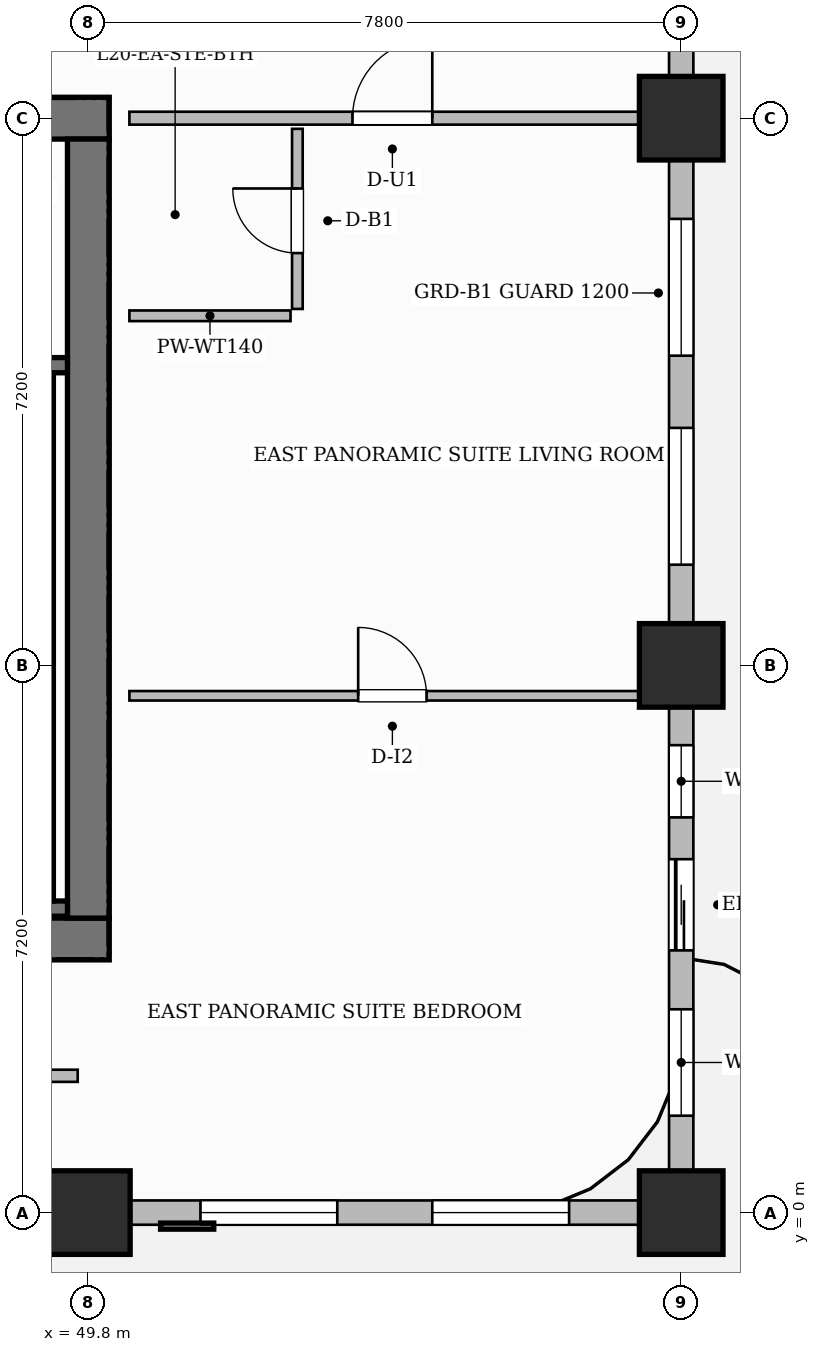
"""IFC4 building model, lengths in metres.
Left out: names, types, materials, properties, quantities, classifications, styles, units other than length and angle.
Written with IfcOpenShell. Run it as: python <this file> out.ifc"""

import sys

from ifc_helpers import new_model, si_unit, direction, frame, frame_2d, origin, origin_2d, place, context, subcontext, project, spatial, rectangle, extrude, source, transform, mapped, element, fill, save


model = new_model("IFC4")
c1 = context("Model", 3, precision=1e-05, world=origin(), true_north=direction((0.0, 1.0)))
c2 = subcontext(c1, "Body", "Model", "MODEL_VIEW")
j1 = project(units=[si_unit("LENGTHUNIT", "METRE"), si_unit("PLANEANGLEUNIT", "RADIAN")], contexts=[c1])
p1 = place(None, origin())
s1 = spatial("IfcSite", under=j1, at=p1, CompositionType="ELEMENT")
p2 = place(p1, origin())
s2 = spatial("IfcBuilding", under=s1, at=p2, CompositionType="ELEMENT")
p3 = place(p2, frame((0.0, 0.0, 84.2)))
s3 = spatial("IfcBuildingStorey", under=s2, at=p3, CompositionType="ELEMENT", Elevation=84.2)
p4 = place(p3, frame((34.525, 3.6, 0.0), z_axis=(0.0, 0.0, 1.0), x_axis=(1.0, 0.0, 0.0)))
e1 = element("IfcWall", 1, at=p4, inside=s3, PredefinedType="SHEAR", context=c2, shape_type="SweptSolid", body=[
    extrude(rectangle(XDim=15.55, YDim=0.55, at=frame_2d((7.775, 0.0))), origin(), (0.0, 0.0, 1.0), 3.7),
])
p5 = place(p4, frame((4.745, 0.0, 0.0)))
e2 = element("IfcOpeningElement", 2, at=p5, cuts=e1, PredefinedType="OPENING", context=c2, shape_type="SweptSolid", body=[
    extrude(rectangle(XDim=0.9, YDim=2.1, at=frame_2d((0.45, 1.05))), frame((0.0, 0.285, 0.0), z_axis=(0.0, -1.0, 0.0), x_axis=(1.0, 0.0, 0.0)), (0.0, 0.0, 1.0), 0.57),
])
p6 = place(p4, frame((7.125, 0.0, 0.0)))
e3 = element("IfcOpeningElement", 3, at=p6, cuts=e1, PredefinedType="OPENING", context=c2, shape_type="SweptSolid", body=[
    extrude(rectangle(XDim=0.9, YDim=2.1, at=frame_2d((0.45, 1.05))), frame((0.0, 0.285, 0.0), z_axis=(0.0, -1.0, 0.0), x_axis=(1.0, 0.0, 0.0)), (0.0, 0.0, 1.0), 0.57),
])
p7 = place(p3, frame((34.525, 14.4, 0.0), z_axis=(0.0, 0.0, 1.0), x_axis=(1.0, 0.0, 0.0)))
e4 = element("IfcWall", 4, at=p7, inside=s3, PredefinedType="SHEAR", context=c2, shape_type="SweptSolid", body=[
    extrude(rectangle(XDim=15.55, YDim=0.55, at=frame_2d((7.775, 0.0))), origin(), (0.0, 0.0, 1.0), 3.7),
])
p8 = place(p7, frame((5.405, 0.0, 0.0)))
e5 = element("IfcOpeningElement", 5, at=p8, cuts=e4, PredefinedType="OPENING", context=c2, shape_type="SweptSolid", body=[
    extrude(rectangle(XDim=1.5, YDim=2.2, at=frame_2d((0.75, 1.1))), frame((0.0, 0.285, 0.0), z_axis=(0.0, -1.0, 0.0), x_axis=(1.0, 0.0, 0.0)), (0.0, 0.0, 1.0), 0.57),
])
p9 = place(p7, frame((1.62, 0.0, 0.0)))
e6 = element("IfcOpeningElement", 6, at=p9, cuts=e4, PredefinedType="OPENING", context=c2, shape_type="SweptSolid", body=[
    extrude(rectangle(XDim=1.05, YDim=2.15, at=frame_2d((0.525, 1.075))), frame((0.0, 0.285, 0.0), z_axis=(0.0, -1.0, 0.0), x_axis=(1.0, 0.0, 0.0)), (0.0, 0.0, 1.0), 0.57),
])
p10 = place(p7, frame((11.25, 0.0, 0.0)))
e7 = element("IfcOpeningElement", 7, at=p10, cuts=e4, PredefinedType="OPENING", context=c2, shape_type="SweptSolid", body=[
    extrude(rectangle(XDim=1.05, YDim=2.15, at=frame_2d((0.525, 1.075))), frame((0.0, 0.285, 0.0), z_axis=(0.0, -1.0, 0.0), x_axis=(1.0, 0.0, 0.0)), (0.0, 0.0, 1.0), 0.57),
])
p11 = place(p3, frame((49.8, 3.875, 0.0), z_axis=(0.0, 0.0, 1.0), x_axis=(0.0, 1.0, 0.0)))
e8 = element("IfcWall", 8, at=p11, inside=s3, PredefinedType="SHEAR", context=c2, shape_type="SweptSolid", body=[
    extrude(rectangle(XDim=10.25, YDim=0.55, at=frame_2d((5.125, 0.0))), origin(), (0.0, 0.0, 1.0), 3.7),
])
m1 = source(origin(), c2, "Body", "SweptSolid", [
    extrude(rectangle(XDim=1.1, YDim=1.1, at=origin_2d()), origin(), (0.0, 0.0, 1.0), 3.7),
])
for number, where, z_axis, x_axis in (
    (9, (49.8, 0.0, 0.0), (0.0, 0.0, 1.0), (1.0, 0.0, 0.0)),
    (10, (57.6, 0.0, 0.0), (0.0, 0.0, 1.0), (1.0, 0.0, 0.0)),
    (11, (57.6, 7.2, 0.0), (0.0, 0.0, 1.0), (1.0, 0.0, 0.0)),
    (12, (57.6, 14.4, 0.0), (0.0, 0.0, 1.0), (1.0, 0.0, 0.0)),
):
    element("IfcColumn", number, at=place(p3, frame(where, z_axis=z_axis, x_axis=x_axis)), inside=s3, PredefinedType="COLUMN", context=c2, shape_type="MappedRepresentation", body=[
        mapped(m1, transform((0.0, 0.0, 0.0), scale=1.0)),
    ])
p12 = place(p3, frame((43.12, 4.0, 0.0), z_axis=(0.0, 0.0, 1.0), x_axis=(1.0, 0.0, 0.0)))
e13 = element("IfcWall", 13, at=p12, inside=s3, PredefinedType="SHEAR", context=c2, shape_type="SweptSolid", body=[
    extrude(rectangle(XDim=6.405, YDim=0.2, at=frame_2d((3.202, 0.0))), origin(), (0.0, 0.0, 1.0), 3.7),
])
p13 = place(p3, frame((49.24, 4.1, 0.0), z_axis=(0.0, 0.0, 1.0), x_axis=(0.0, 1.0, 0.0)))
e14 = element("IfcWall", 14, at=p13, inside=s3, PredefinedType="SHEAR", context=c2, shape_type="SweptSolid", body=[
    extrude(rectangle(XDim=6.95, YDim=0.2, at=frame_2d((3.475, 0.0))), origin(), (0.0, 0.0, 1.0), 3.7),
])
p14 = place(p3, frame((43.12, 11.15, 0.0), z_axis=(0.0, 0.0, 1.0), x_axis=(1.0, 0.0, 0.0)))
e15 = element("IfcWall", 15, at=p14, inside=s3, PredefinedType="SHEAR", context=c2, shape_type="SweptSolid", body=[
    extrude(rectangle(XDim=6.405, YDim=0.2, at=frame_2d((3.202, 0.0))), origin(), (0.0, 0.0, 1.0), 3.7),
])
p15 = place(p14, frame((1.045, 0.0, 0.0)))
e16 = element("IfcOpeningElement", 16, at=p15, cuts=e15, PredefinedType="OPENING", context=c2, shape_type="SweptSolid", body=[
    extrude(rectangle(XDim=1.05, YDim=2.2, at=frame_2d((0.525, 1.1))), frame((0.0, 0.11, 0.0), z_axis=(0.0, -1.0, 0.0), x_axis=(1.0, 0.0, 0.0)), (0.0, 0.0, 1.0), 0.22),
])
p16 = place(p14, frame((4.125, 0.0, 0.0)))
e17 = element("IfcOpeningElement", 17, at=p16, cuts=e15, PredefinedType="OPENING", context=c2, shape_type="SweptSolid", body=[
    extrude(rectangle(XDim=1.05, YDim=2.2, at=frame_2d((0.525, 1.1))), frame((0.0, 0.11, 0.0), z_axis=(0.0, -1.0, 0.0), x_axis=(1.0, 0.0, 0.0)), (0.0, 0.0, 1.0), 0.22),
])
p17 = place(p3, frame((30.29, 1.8, 0.0), z_axis=(0.0, 0.0, 1.0), x_axis=(1.0, 0.0, 0.0)))
e18 = element("IfcWall", 18, at=p17, inside=s3, PredefinedType="PARTITIONING", context=c2, shape_type="SweptSolid", body=[
    extrude(rectangle(XDim=19.37, YDim=0.16, at=frame_2d((9.685, 0.0))), origin(), (0.0, 0.0, 1.0), 3.45),
])
p18 = place(p17, frame((9.735, 0.0, 0.0)))
e19 = element("IfcOpeningElement", 19, at=p18, cuts=e18, PredefinedType="OPENING", context=c2, shape_type="SweptSolid", body=[
    extrude(rectangle(XDim=0.95, YDim=2.15, at=frame_2d((0.475, 1.075))), frame((0.0, 0.09, 0.0), z_axis=(0.0, -1.0, 0.0), x_axis=(1.0, 0.0, 0.0)), (0.0, 0.0, 1.0), 0.18),
])
p19 = place(p3, frame((50.34, 14.4, 0.0), z_axis=(0.0, 0.0, 1.0), x_axis=(1.0, 0.0, 0.0)))
e20 = element("IfcWall", 20, at=p19, inside=s3, PredefinedType="PARTITIONING", context=c2, shape_type="SweptSolid", body=[
    extrude(rectangle(XDim=7.07, YDim=0.17, at=frame_2d((3.535, 0.0))), origin(), (0.0, 0.0, 1.0), 2.885),
])
p20 = place(p19, frame((2.935, 0.0, 0.0)))
e21 = element("IfcOpeningElement", 21, at=p20, cuts=e20, PredefinedType="OPENING", context=c2, shape_type="SweptSolid", body=[
    extrude(rectangle(XDim=1.05, YDim=2.25, at=frame_2d((0.525, 1.125))), frame((0.0, 0.095, 0.0), z_axis=(0.0, -1.0, 0.0), x_axis=(1.0, 0.0, 0.0)), (0.0, 0.0, 1.0), 0.19),
])
p21 = place(p3, frame((52.55, 11.89, 0.0), z_axis=(0.0, 0.0, 1.0), x_axis=(0.0, 1.0, 0.0)))
e22 = element("IfcWall", 22, at=p21, inside=s3, PredefinedType="PARTITIONING", context=c2, shape_type="SweptSolid", body=[
    extrude(rectangle(XDim=2.37, YDim=0.14, at=frame_2d((1.185, 0.0))), origin(), (0.0, 0.0, 1.0), 3.45),
])
p22 = place(p21, frame((0.735, 0.0, 0.0)))
e23 = element("IfcOpeningElement", 23, at=p22, cuts=e22, PredefinedType="OPENING", context=c2, shape_type="SweptSolid", body=[
    extrude(rectangle(XDim=0.85, YDim=2.1, at=frame_2d((0.425, 1.05))), frame((0.0, 0.08, 0.0), z_axis=(0.0, -1.0, 0.0), x_axis=(1.0, 0.0, 0.0)), (0.0, 0.0, 1.0), 0.16),
])
p23 = place(p3, frame((50.34, 11.8, 0.0), z_axis=(0.0, 0.0, 1.0), x_axis=(1.0, 0.0, 0.0)))
e24 = element("IfcWall", 24, at=p23, inside=s3, PredefinedType="PARTITIONING", context=c2, shape_type="SweptSolid", body=[
    extrude(rectangle(XDim=2.12, YDim=0.14, at=frame_2d((1.06, 0.0))), origin(), (0.0, 0.0, 1.0), 3.45),
])
p24 = place(p3, frame((50.34, 6.8, 0.0), z_axis=(0.0, 0.0, 1.0), x_axis=(1.0, 0.0, 0.0)))
e25 = element("IfcWall", 25, at=p24, inside=s3, PredefinedType="PARTITIONING", context=c2, shape_type="SweptSolid", body=[
    extrude(rectangle(XDim=7.07, YDim=0.125, at=frame_2d((3.535, 0.0))), origin(), (0.0, 0.0, 1.0), 3.45),
])
p25 = place(p24, frame((3.01, 0.0, 0.0)))
e26 = element("IfcOpeningElement", 26, at=p25, cuts=e25, PredefinedType="OPENING", context=c2, shape_type="SweptSolid", body=[
    extrude(rectangle(XDim=0.9, YDim=2.15, at=frame_2d((0.45, 1.075))), frame((0.0, 0.073, 0.0), z_axis=(0.0, -1.0, 0.0), x_axis=(1.0, 0.0, 0.0)), (0.0, 0.0, 1.0), 0.145),
])
p26 = place(p3, frame((14.4, 0.0, 0.0), z_axis=(0.0, 0.0, 1.0), x_axis=(1.0, 0.0, 0.0)))
e27 = element("IfcWall", 27, at=p26, inside=s3, PredefinedType="SOLIDWALL", context=c2, shape_type="SweptSolid", body=[
    extrude(rectangle(XDim=43.2, YDim=0.32, at=frame_2d((21.6, 0.0))), origin(), (0.0, 0.0, 1.0), 2.885),
])
p27 = place(p26, frame((0.85, 0.0, 0.0)))
e28 = element("IfcOpeningElement", 28, at=p27, cuts=e27, PredefinedType="OPENING", context=c2, shape_type="SweptSolid", body=[
    extrude(rectangle(XDim=1.2, YDim=2.2, at=frame_2d((0.6, 1.1))), frame((0.0, 0.17, 0.0), z_axis=(0.0, -1.0, 0.0), x_axis=(1.0, 0.0, 0.0)), (0.0, 0.0, 1.0), 0.34),
])
p28 = place(p26, frame((3.475, 0.0, 0.8)))
e29 = element("IfcOpeningElement", 29, at=p28, cuts=e27, PredefinedType="OPENING", context=c2, shape_type="SweptSolid", body=[
    extrude(rectangle(XDim=1.8, YDim=1.85, at=frame_2d((0.9, 0.925))), frame((0.0, 0.17, 0.0), z_axis=(0.0, -1.0, 0.0), x_axis=(1.0, 0.0, 0.0)), (0.0, 0.0, 1.0), 0.34),
])
p29 = place(p26, frame((8.181, 0.0, 0.8)))
e30 = element("IfcOpeningElement", 30, at=p29, cuts=e27, PredefinedType="OPENING", context=c2, shape_type="SweptSolid", body=[
    extrude(rectangle(XDim=0.95, YDim=1.75, at=frame_2d((0.475, 0.875))), frame((0.0, 0.17, 0.0), z_axis=(0.0, -1.0, 0.0), x_axis=(1.0, 0.0, 0.0)), (0.0, 0.0, 1.0), 0.34),
])
p30 = place(p26, frame((10.564, 0.0, 0.8)))
e31 = element("IfcOpeningElement", 31, at=p30, cuts=e27, PredefinedType="OPENING", context=c2, shape_type="SweptSolid", body=[
    extrude(rectangle(XDim=1.8, YDim=1.85, at=frame_2d((0.9, 0.925))), frame((0.0, 0.17, 0.0), z_axis=(0.0, -1.0, 0.0), x_axis=(1.0, 0.0, 0.0)), (0.0, 0.0, 1.0), 0.34),
])
p31 = place(p26, frame((16.804, 0.0, 0.8)))
e32 = element("IfcOpeningElement", 32, at=p31, cuts=e27, PredefinedType="OPENING", context=c2, shape_type="SweptSolid", body=[
    extrude(rectangle(XDim=1.8, YDim=1.85, at=frame_2d((0.9, 0.925))), frame((0.0, 0.17, 0.0), z_axis=(0.0, -1.0, 0.0), x_axis=(1.0, 0.0, 0.0)), (0.0, 0.0, 1.0), 0.34),
])
p32 = place(p26, frame((21.725, 0.0, 0.8)))
e33 = element("IfcOpeningElement", 33, at=p32, cuts=e27, PredefinedType="OPENING", context=c2, shape_type="SweptSolid", body=[
    extrude(rectangle(XDim=1.8, YDim=1.85, at=frame_2d((0.9, 0.925))), frame((0.0, 0.17, 0.0), z_axis=(0.0, -1.0, 0.0), x_axis=(1.0, 0.0, 0.0)), (0.0, 0.0, 1.0), 0.34),
])
p33 = place(p26, frame((24.475, 0.0, 0.8)))
e34 = element("IfcOpeningElement", 34, at=p33, cuts=e27, PredefinedType="OPENING", context=c2, shape_type="SweptSolid", body=[
    extrude(rectangle(XDim=1.8, YDim=1.85, at=frame_2d((0.9, 0.925))), frame((0.0, 0.17, 0.0), z_axis=(0.0, -1.0, 0.0), x_axis=(1.0, 0.0, 0.0)), (0.0, 0.0, 1.0), 0.34),
])
p34 = place(p26, frame((29.075, 0.0, 0.8)))
e35 = element("IfcOpeningElement", 35, at=p34, cuts=e27, PredefinedType="OPENING", context=c2, shape_type="SweptSolid", body=[
    extrude(rectangle(XDim=1.8, YDim=1.85, at=frame_2d((0.9, 0.925))), frame((0.0, 0.17, 0.0), z_axis=(0.0, -1.0, 0.0), x_axis=(1.0, 0.0, 0.0)), (0.0, 0.0, 1.0), 0.34),
])
p35 = place(p26, frame((32.125, 0.0, 0.8)))
e36 = element("IfcOpeningElement", 36, at=p35, cuts=e27, PredefinedType="OPENING", context=c2, shape_type="SweptSolid", body=[
    extrude(rectangle(XDim=1.8, YDim=1.85, at=frame_2d((0.9, 0.925))), frame((0.0, 0.17, 0.0), z_axis=(0.0, -1.0, 0.0), x_axis=(1.0, 0.0, 0.0)), (0.0, 0.0, 1.0), 0.34),
])
p36 = place(p26, frame((36.875, 0.0, 0.8)))
e37 = element("IfcOpeningElement", 37, at=p36, cuts=e27, PredefinedType="OPENING", context=c2, shape_type="SweptSolid", body=[
    extrude(rectangle(XDim=1.8, YDim=1.85, at=frame_2d((0.9, 0.925))), frame((0.0, 0.17, 0.0), z_axis=(0.0, -1.0, 0.0), x_axis=(1.0, 0.0, 0.0)), (0.0, 0.0, 1.0), 0.34),
])
p37 = place(p26, frame((39.925, 0.0, 0.8)))
e38 = element("IfcOpeningElement", 38, at=p37, cuts=e27, PredefinedType="OPENING", context=c2, shape_type="SweptSolid", body=[
    extrude(rectangle(XDim=1.8, YDim=1.85, at=frame_2d((0.9, 0.925))), frame((0.0, 0.17, 0.0), z_axis=(0.0, -1.0, 0.0), x_axis=(1.0, 0.0, 0.0)), (0.0, 0.0, 1.0), 0.34),
])
p38 = place(p3, frame((57.6, 0.05, 0.0), z_axis=(0.0, 0.0, 1.0), x_axis=(0.0, 1.0, 0.0)))
e39 = element("IfcWall", 39, at=p38, inside=s3, PredefinedType="SOLIDWALL", context=c2, shape_type="SweptSolid", body=[
    extrude(rectangle(XDim=21.5, YDim=0.32, at=frame_2d((10.75, 0.0))), origin(), (0.0, 0.0, 1.0), 2.885),
])
p39 = place(p38, frame((3.4, 0.0, 0.0)))
e40 = element("IfcOpeningElement", 40, at=p39, cuts=e39, PredefinedType="OPENING", context=c2, shape_type="SweptSolid", body=[
    extrude(rectangle(XDim=1.2, YDim=2.2, at=frame_2d((0.6, 1.1))), frame((0.0, 0.17, 0.0), z_axis=(0.0, -1.0, 0.0), x_axis=(1.0, 0.0, 0.0)), (0.0, 0.0, 1.0), 0.34),
])
p40 = place(p38, frame((1.225, 0.0, 0.8)))
e41 = element("IfcOpeningElement", 41, at=p40, cuts=e39, PredefinedType="OPENING", context=c2, shape_type="SweptSolid", body=[
    extrude(rectangle(XDim=1.4, YDim=1.85, at=frame_2d((0.7, 0.925))), frame((0.0, 0.17, 0.0), z_axis=(0.0, -1.0, 0.0), x_axis=(1.0, 0.0, 0.0)), (0.0, 0.0, 1.0), 0.34),
])
p41 = place(p38, frame((5.15, 0.0, 0.8)))
e42 = element("IfcOpeningElement", 42, at=p41, cuts=e39, PredefinedType="OPENING", context=c2, shape_type="SweptSolid", body=[
    extrude(rectangle(XDim=0.95, YDim=1.75, at=frame_2d((0.475, 0.875))), frame((0.0, 0.17, 0.0), z_axis=(0.0, -1.0, 0.0), x_axis=(1.0, 0.0, 0.0)), (0.0, 0.0, 1.0), 0.34),
])
p42 = place(p38, frame((8.475, 0.0, 0.8)))
e43 = element("IfcOpeningElement", 43, at=p42, cuts=e39, PredefinedType="OPENING", context=c2, shape_type="SweptSolid", body=[
    extrude(rectangle(XDim=1.8, YDim=1.85, at=frame_2d((0.9, 0.925))), frame((0.0, 0.17, 0.0), z_axis=(0.0, -1.0, 0.0), x_axis=(1.0, 0.0, 0.0)), (0.0, 0.0, 1.0), 0.34),
])
p43 = place(p38, frame((11.225, 0.0, 0.8)))
e44 = element("IfcOpeningElement", 44, at=p43, cuts=e39, PredefinedType="OPENING", context=c2, shape_type="SweptSolid", body=[
    extrude(rectangle(XDim=1.8, YDim=1.85, at=frame_2d((0.9, 0.925))), frame((0.0, 0.17, 0.0), z_axis=(0.0, -1.0, 0.0), x_axis=(1.0, 0.0, 0.0)), (0.0, 0.0, 1.0), 0.34),
])
p44 = place(p38, frame((17.679, 0.0, 0.8)))
e45 = element("IfcOpeningElement", 45, at=p44, cuts=e39, PredefinedType="OPENING", context=c2, shape_type="SweptSolid", body=[
    extrude(rectangle(XDim=1.8, YDim=1.85, at=frame_2d((0.9, 0.925))), frame((0.0, 0.17, 0.0), z_axis=(0.0, -1.0, 0.0), x_axis=(1.0, 0.0, 0.0)), (0.0, 0.0, 1.0), 0.34),
])
m2 = source(origin(), c2, "Body", "SweptSolid", [
    extrude(rectangle(XDim=1.05, YDim=2.25, at=frame_2d((0.525, 1.125))), frame((0.0, 0.025, 0.0), z_axis=(0.0, -1.0, 0.0), x_axis=(1.0, 0.0, 0.0)), (0.0, 0.0, 1.0), 0.05),
])
p45 = place(p20, origin())
e46 = element("IfcDoor", 46, at=p45, inside=s3, OperationType="SINGLE_SWING_RIGHT", PredefinedType="DOOR", context=c2, shape_type="MappedRepresentation", body=[
    mapped(m2, transform((0.0, 0.0, 0.0), scale=1.0)),
])
fill(e21, e46)
m3 = source(origin(), c2, "Body", "SweptSolid", [
    extrude(rectangle(XDim=0.85, YDim=2.1, at=frame_2d((0.425, 1.05))), frame((0.0, 0.025, 0.0), z_axis=(0.0, -1.0, 0.0), x_axis=(1.0, 0.0, 0.0)), (0.0, 0.0, 1.0), 0.05),
])
p46 = place(p22, origin())
e47 = element("IfcDoor", 47, at=p46, inside=s3, OperationType="SINGLE_SWING_RIGHT", PredefinedType="DOOR", context=c2, shape_type="MappedRepresentation", body=[
    mapped(m3, transform((0.0, 0.0, 0.0), scale=1.0)),
])
fill(e23, e47)
m4 = source(origin(), c2, "Body", "SweptSolid", [
    extrude(rectangle(XDim=0.9, YDim=2.15, at=frame_2d((0.45, 1.075))), frame((0.0, 0.025, 0.0), z_axis=(0.0, -1.0, 0.0), x_axis=(1.0, 0.0, 0.0)), (0.0, 0.0, 1.0), 0.05),
])
p47 = place(p25, origin())
e48 = element("IfcDoor", 48, at=p47, inside=s3, OperationType="SINGLE_SWING_LEFT", PredefinedType="DOOR", context=c2, shape_type="MappedRepresentation", body=[
    mapped(m4, transform((0.0, 0.0, 0.0), scale=1.0)),
])
fill(e26, e48)
m5 = source(origin(), c2, "Body", "SweptSolid", [
    extrude(rectangle(XDim=1.2, YDim=2.2, at=frame_2d((0.6, 1.1))), frame((0.0, 0.025, 0.0), z_axis=(0.0, -1.0, 0.0), x_axis=(1.0, 0.0, 0.0)), (0.0, 0.0, 1.0), 0.05),
])
p48 = place(p39, origin())
e49 = element("IfcDoor", 49, at=p48, inside=s3, OperationType="SLIDING_TO_LEFT", PredefinedType="DOOR", context=c2, shape_type="MappedRepresentation", body=[
    mapped(m5, transform((0.0, 0.0, 0.0), scale=1.0)),
])
fill(e40, e49)
m6 = source(origin(), c2, "Body", "SweptSolid", [
    extrude(rectangle(XDim=1.8, YDim=1.85, at=frame_2d((0.9, 0.925))), frame((0.0, 0.03, 0.0), z_axis=(0.0, -1.0, 0.0), x_axis=(1.0, 0.0, 0.0)), (0.0, 0.0, 1.0), 0.06),
])
p49 = place(p36, origin())
e50 = element("IfcWindow", 50, at=p49, inside=s3, PartitioningType="DOUBLE_PANEL_VERTICAL", PredefinedType="WINDOW", context=c2, shape_type="MappedRepresentation", body=[
    mapped(m6, transform((0.0, 0.0, 0.0), scale=1.0)),
])
fill(e37, e50)
p50 = place(p37, origin())
e51 = element("IfcWindow", 51, at=p50, inside=s3, PartitioningType="DOUBLE_PANEL_VERTICAL", PredefinedType="WINDOW", context=c2, shape_type="MappedRepresentation", body=[
    mapped(m6, transform((0.0, 0.0, 0.0), scale=1.0)),
])
fill(e38, e51)
m7 = source(origin(), c2, "Body", "SweptSolid", [
    extrude(rectangle(XDim=1.4, YDim=1.85, at=frame_2d((0.7, 0.925))), frame((0.0, 0.03, 0.0), z_axis=(0.0, -1.0, 0.0), x_axis=(1.0, 0.0, 0.0)), (0.0, 0.0, 1.0), 0.06),
])
p51 = place(p40, origin())
e52 = element("IfcWindow", 52, at=p51, inside=s3, PartitioningType="SINGLE_PANEL", PredefinedType="WINDOW", context=c2, shape_type="MappedRepresentation", body=[
    mapped(m7, transform((0.0, 0.0, 0.0), scale=1.0)),
])
fill(e41, e52)
m8 = source(origin(), c2, "Body", "SweptSolid", [
    extrude(rectangle(XDim=0.95, YDim=1.75, at=frame_2d((0.475, 0.875))), frame((0.0, 0.03, 0.0), z_axis=(0.0, -1.0, 0.0), x_axis=(1.0, 0.0, 0.0)), (0.0, 0.0, 1.0), 0.06),
])
p52 = place(p41, origin())
e53 = element("IfcWindow", 53, at=p52, inside=s3, PartitioningType="SINGLE_PANEL", PredefinedType="WINDOW", context=c2, shape_type="MappedRepresentation", body=[
    mapped(m8, transform((0.0, 0.0, 0.0), scale=1.0)),
])
fill(e42, e53)
p53 = place(p42, origin())
e54 = element("IfcWindow", 54, at=p53, inside=s3, PartitioningType="DOUBLE_PANEL_VERTICAL", PredefinedType="WINDOW", context=c2, shape_type="MappedRepresentation", body=[
    mapped(m6, transform((0.0, 0.0, 0.0), scale=1.0)),
])
fill(e43, e54)
p54 = place(p43, origin())
e55 = element("IfcWindow", 55, at=p54, inside=s3, PartitioningType="DOUBLE_PANEL_VERTICAL", PredefinedType="WINDOW", context=c2, shape_type="MappedRepresentation", body=[
    mapped(m6, transform((0.0, 0.0, 0.0), scale=1.0)),
])
fill(e44, e55)
save(model, sys.argv[1])
